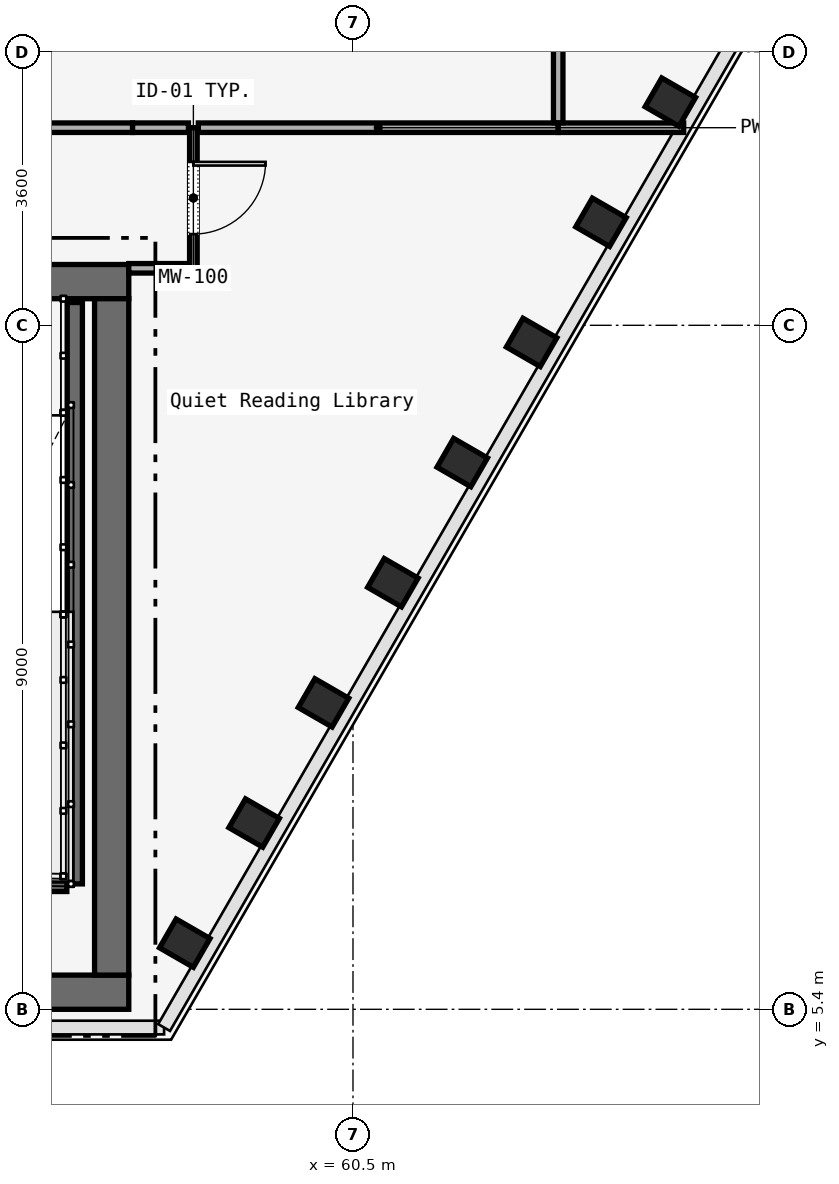
"""IFC4 building model, lengths in metres.
Left out: names, types, materials, properties, quantities, classifications, styles, units other than length and angle.
Written with IfcOpenShell. Run it as: python <this file> out.ifc"""

import sys

from ifc_helpers import new_model, si_unit, direction, frame, frame_2d, origin, origin_2d, place, context, subcontext, project, spatial, rectangle, i_section, extrude, element, fill, save


model = new_model("IFC4")
c1 = context("Model", 3, precision=1e-05, world=origin(), true_north=direction((0.0, 1.0)))
c2 = subcontext(c1, "Body", "Model", "MODEL_VIEW")
j1 = project(units=[si_unit("LENGTHUNIT", "METRE"), si_unit("PLANEANGLEUNIT", "RADIAN")], contexts=[c1])
p1 = place(None, origin())
s1 = spatial("IfcSite", under=j1, at=p1, CompositionType="ELEMENT")
p2 = place(p1, origin())
s2 = spatial("IfcBuilding", under=s1, at=p2, CompositionType="ELEMENT")
p3 = place(p2, frame((0.0, 0.0, 70.2)))
s3 = spatial("IfcBuildingStorey", under=s2, at=p3, CompositionType="ELEMENT", Elevation=70.2)
p4 = place(p3, frame((26.45, 14.975, 0.0), z_axis=(0.0, 0.0, 1.0), x_axis=(1.0, 0.0, 0.0)))
e1 = element("IfcWall", 1, at=p4, inside=s3, PredefinedType="SOLIDWALL", context=c2, shape_type="SweptSolid", body=[
    extrude(rectangle(XDim=31.1, YDim=0.45, at=frame_2d((15.55, 0.0))), origin(), (0.0, 0.0, 1.0), 3.58),
])
p5 = place(p4, frame((1.65, 0.0, 0.0)))
e2 = element("IfcOpeningElement", 2, at=p5, cuts=e1, PredefinedType="OPENING", context=c2, shape_type="SweptSolid", body=[
    extrude(rectangle(XDim=1.1, YDim=2.2, at=frame_2d((0.55, 1.1))), frame((0.0, 0.225, 0.0), z_axis=(0.0, -1.0, 0.0), x_axis=(1.0, 0.0, 0.0)), (0.0, 0.0, 1.0), 0.45),
])
p6 = place(p4, frame((13.65, 0.0, 0.0)))
e3 = element("IfcOpeningElement", 3, at=p6, cuts=e1, PredefinedType="OPENING", context=c2, shape_type="SweptSolid", body=[
    extrude(rectangle(XDim=1.1, YDim=2.2, at=frame_2d((0.55, 1.1))), frame((0.0, 0.225, 0.0), z_axis=(0.0, -1.0, 0.0), x_axis=(1.0, 0.0, 0.0)), (0.0, 0.0, 1.0), 0.45),
])
p7 = place(p4, frame((25.55, 0.0, 0.0)))
e4 = element("IfcOpeningElement", 4, at=p7, cuts=e1, PredefinedType="OPENING", context=c2, shape_type="SweptSolid", body=[
    extrude(rectangle(XDim=1.1, YDim=2.2, at=frame_2d((0.55, 1.1))), frame((0.0, 0.225, 0.0), z_axis=(0.0, -1.0, 0.0), x_axis=(1.0, 0.0, 0.0)), (0.0, 0.0, 1.0), 0.45),
])
p8 = place(p4, frame((10.7, 0.0, 0.0)))
e5 = element("IfcOpeningElement", 5, at=p8, cuts=e1, PredefinedType="OPENING", context=c2, shape_type="SweptSolid", body=[
    extrude(rectangle(XDim=1.4, YDim=2.2, at=frame_2d((0.7, 1.1))), frame((0.0, 0.225, 0.0), z_axis=(0.0, -1.0, 0.0), x_axis=(1.0, 0.0, 0.0)), (0.0, 0.0, 1.0), 0.45),
])
p9 = place(p4, frame((19.35, 0.0, 0.0)))
e6 = element("IfcOpeningElement", 6, at=p9, cuts=e1, PredefinedType="OPENING", context=c2, shape_type="SweptSolid", body=[
    extrude(rectangle(XDim=1.1, YDim=2.2, at=frame_2d((0.55, 1.1))), frame((0.0, 0.225, 0.0), z_axis=(0.0, -1.0, 0.0), x_axis=(1.0, 0.0, 0.0)), (0.0, 0.0, 1.0), 0.45),
])
p10 = place(p4, frame((21.4, 0.0, 0.0)))
e7 = element("IfcOpeningElement", 7, at=p10, cuts=e1, PredefinedType="OPENING", context=c2, shape_type="SweptSolid", body=[
    extrude(rectangle(XDim=0.9, YDim=2.1, at=frame_2d((0.45, 1.05))), frame((0.0, 0.225, 0.0), z_axis=(0.0, -1.0, 0.0), x_axis=(1.0, 0.0, 0.0)), (0.0, 0.0, 1.0), 0.45),
])
p11 = place(p4, frame((23.35, 0.0, 0.0)))
e8 = element("IfcOpeningElement", 8, at=p11, cuts=e1, PredefinedType="OPENING", context=c2, shape_type="SweptSolid", body=[
    extrude(rectangle(XDim=1.3, YDim=2.3, at=frame_2d((0.65, 1.15))), frame((0.0, 0.225, 0.0), z_axis=(0.0, -1.0, 0.0), x_axis=(1.0, 0.0, 0.0)), (0.0, 0.0, 1.0), 0.45),
])
p12 = place(p3, frame((26.45, 5.625, 0.0), z_axis=(0.0, 0.0, 1.0), x_axis=(1.0, 0.0, 0.0)))
e9 = element("IfcWall", 9, at=p12, inside=s3, PredefinedType="SOLIDWALL", context=c2, shape_type="SweptSolid", body=[
    extrude(rectangle(XDim=31.1, YDim=0.45, at=frame_2d((15.55, 0.0))), origin(), (0.0, 0.0, 1.0), 3.58),
])
p13 = place(p3, frame((57.325, 5.85, 0.0), z_axis=(0.0, 0.0, 1.0), x_axis=(0.0, 1.0, 0.0)))
e10 = element("IfcWall", 10, at=p13, inside=s3, PredefinedType="SOLIDWALL", context=c2, shape_type="SweptSolid", body=[
    extrude(rectangle(XDim=8.9, YDim=0.45, at=frame_2d((4.45, 0.0))), origin(), (0.0, 0.0, 1.0), 3.58),
])
for number, where, z_axis, x_axis in (
    (11, (58.287, 6.271, 0.0), (0.0, 0.0, 1.0), (0.5, 0.866, 0.0)),
    (12, (59.199, 7.851, 0.0), (0.0, 0.0, 1.0), (0.5, 0.866, 0.0)),
    (13, (60.112, 9.432, 0.0), (0.0, 0.0, 1.0), (0.5, 0.866, 0.0)),
    (14, (61.025, 11.013, 0.0), (0.0, 0.0, 1.0), (0.5, 0.866, 0.0)),
    (15, (61.938, 12.594, 0.0), (0.0, 0.0, 1.0), (0.5, 0.866, 0.0)),
    (16, (62.85, 14.175, 0.0), (0.0, 0.0, 1.0), (0.5, 0.866, 0.0)),
    (17, (63.763, 15.756, 0.0), (0.0, 0.0, 1.0), (0.5, 0.866, 0.0)),
    (18, (64.676, 17.337, 0.0), (0.0, 0.0, 1.0), (0.5, 0.866, 0.0)),
):
    element("IfcColumn", number, at=place(p3, frame(where, z_axis=z_axis, x_axis=x_axis)), inside=s3, PredefinedType="COLUMN", context=c2, shape_type="SweptSolid", body=[
        extrude(i_section(OverallWidth=0.437, OverallDepth=0.514, WebThickness=0.061, FlangeThickness=0.077, FilletRadius=0.015, at=origin_2d()), origin(), (0.0, 0.0, 1.0), 3.58),
    ])
p14 = place(p3, frame((56.84, 14.7, 0.0), z_axis=(0.0, 0.0, 1.0), x_axis=(0.0, -1.0, 0.0)))
e19 = element("IfcWall", 19, at=p14, inside=s3, PredefinedType="SOLIDWALL", context=c2, shape_type="SweptSolid", body=[
    extrude(rectangle(XDim=7.65, YDim=0.2, at=frame_2d((3.825, 0.0))), origin(), (0.0, 0.0, 1.0), 3.8),
])
p15 = place(p3, frame((53.62, 7.05, 0.0), z_axis=(0.0, 0.0, 1.0), x_axis=(1.0, 0.0, 0.0)))
e20 = element("IfcWall", 20, at=p15, inside=s3, PredefinedType="SOLIDWALL", context=c2, shape_type="SweptSolid", body=[
    extrude(rectangle(XDim=3.115, YDim=0.2, at=frame_2d((1.558, 0.0))), origin(), (0.0, 0.0, 1.0), 3.8),
])
p16 = place(p3, frame((58.4, 17.0, 0.0), z_axis=(0.0, 0.0, 1.0), x_axis=(0.0, -1.0, 0.0)))
e21 = element("IfcWall", 21, at=p16, inside=s3, PredefinedType="MOVABLE", context=c2, shape_type="SweptSolid", body=[
    extrude(rectangle(XDim=1.85, YDim=0.1, at=frame_2d((0.925, 0.0))), origin(), (0.0, 0.0, 1.0), 2.95),
])
p17 = place(p16, frame((0.45, 0.0, 0.0)))
e22 = element("IfcOpeningElement", 22, at=p17, cuts=e21, PredefinedType="OPENING", context=c2, shape_type="SweptSolid", body=[
    extrude(rectangle(XDim=0.95, YDim=2.2, at=frame_2d((0.475, 1.1))), frame((0.0, 0.05, 0.0), z_axis=(0.0, -1.0, 0.0), x_axis=(1.0, 0.0, 0.0)), (0.0, 0.0, 1.0), 0.1),
])
p18 = place(p3, frame((58.335, 15.15, 0.0), z_axis=(0.0, 0.0, 1.0), x_axis=(-1.0, 0.0, 0.0)))
e23 = element("IfcWall", 23, at=p18, inside=s3, PredefinedType="PARTITIONING", context=c2, shape_type="SweptSolid", body=[
    extrude(rectangle(XDim=0.785, YDim=0.125, at=frame_2d((0.393, 0.0))), origin(), (0.0, 0.0, 1.0), 2.95),
])
p19 = place(p3, frame((53.688, 17.0, 0.0), z_axis=(0.0, 0.0, 1.0), x_axis=(1.0, 0.0, 0.0)))
e24 = element("IfcWall", 24, at=p19, inside=s3, PredefinedType="PARTITIONING", context=c2, shape_type="SweptSolid", body=[
    extrude(rectangle(XDim=3.912, YDim=0.125, at=frame_2d((1.956, 0.0))), origin(), (0.0, 0.0, 1.0), 2.95),
])
p20 = place(p19, frame((1.481, 0.0, 0.0)))
e25 = element("IfcOpeningElement", 25, at=p20, cuts=e24, PredefinedType="OPENING", context=c2, shape_type="SweptSolid", body=[
    extrude(rectangle(XDim=0.95, YDim=2.2, at=frame_2d((0.475, 1.1))), frame((0.0, 0.062, 0.0), z_axis=(0.0, -1.0, 0.0), x_axis=(1.0, 0.0, 0.0)), (0.0, 0.0, 1.0), 0.125),
])
p21 = place(p3, frame((57.6, 17.0, 0.0), z_axis=(0.0, 0.0, 1.0), x_axis=(1.0, 0.0, 0.0)))
e26 = element("IfcWall", 26, at=p21, inside=s3, PredefinedType="PARTITIONING", context=c2, shape_type="SweptSolid", body=[
    extrude(rectangle(XDim=0.735, YDim=0.125, at=frame_2d((0.367, 0.0))), origin(), (0.0, 0.0, 1.0), 2.95),
])
p22 = place(p3, frame((58.465, 17.0, 0.0), z_axis=(0.0, 0.0, 1.0), x_axis=(1.0, 0.0, 0.0)))
e27 = element("IfcWall", 27, at=p22, inside=s3, PredefinedType="PARTITIONING", context=c2, shape_type="SweptSolid", body=[
    extrude(rectangle(XDim=4.735, YDim=0.125, at=frame_2d((2.367, 0.0))), origin(), (0.0, 0.0, 1.0), 2.95),
])
p23 = place(p3, frame((63.2, 17.0, 0.0), z_axis=(0.0, 0.0, 1.0), x_axis=(1.0, 0.0, 0.0)))
e28 = element("IfcWall", 28, at=p23, inside=s3, PredefinedType="PARTITIONING", context=c2, shape_type="SweptSolid", body=[
    extrude(rectangle(XDim=1.651, YDim=0.125, at=frame_2d((0.825, 0.0))), origin(), (0.0, 0.0, 1.0), 2.95),
])
p24 = place(p3, frame((63.2, 22.113, 0.0), z_axis=(0.0, 0.0, 1.0), x_axis=(0.0, -1.0, 0.0)))
e29 = element("IfcWall", 29, at=p24, inside=s3, PredefinedType="PARTITIONING", context=c2, shape_type="SweptSolid", body=[
    extrude(rectangle(XDim=5.048, YDim=0.125, at=frame_2d((2.524, 0.0))), origin(), (0.0, 0.0, 1.0), 2.95),
])
p25 = place(p17, origin())
e30 = element("IfcDoor", 30, at=p25, inside=s3, OperationType="SINGLE_SWING_LEFT", PredefinedType="DOOR", context=c2, shape_type="SweptSolid", body=[
    extrude(rectangle(XDim=0.95, YDim=2.2, at=frame_2d((0.475, 1.1))), frame((0.0, 0.025, 0.0), z_axis=(0.0, -1.0, 0.0), x_axis=(1.0, 0.0, 0.0)), (0.0, 0.0, 1.0), 0.05),
])
fill(e22, e30)
save(model, sys.argv[1])
